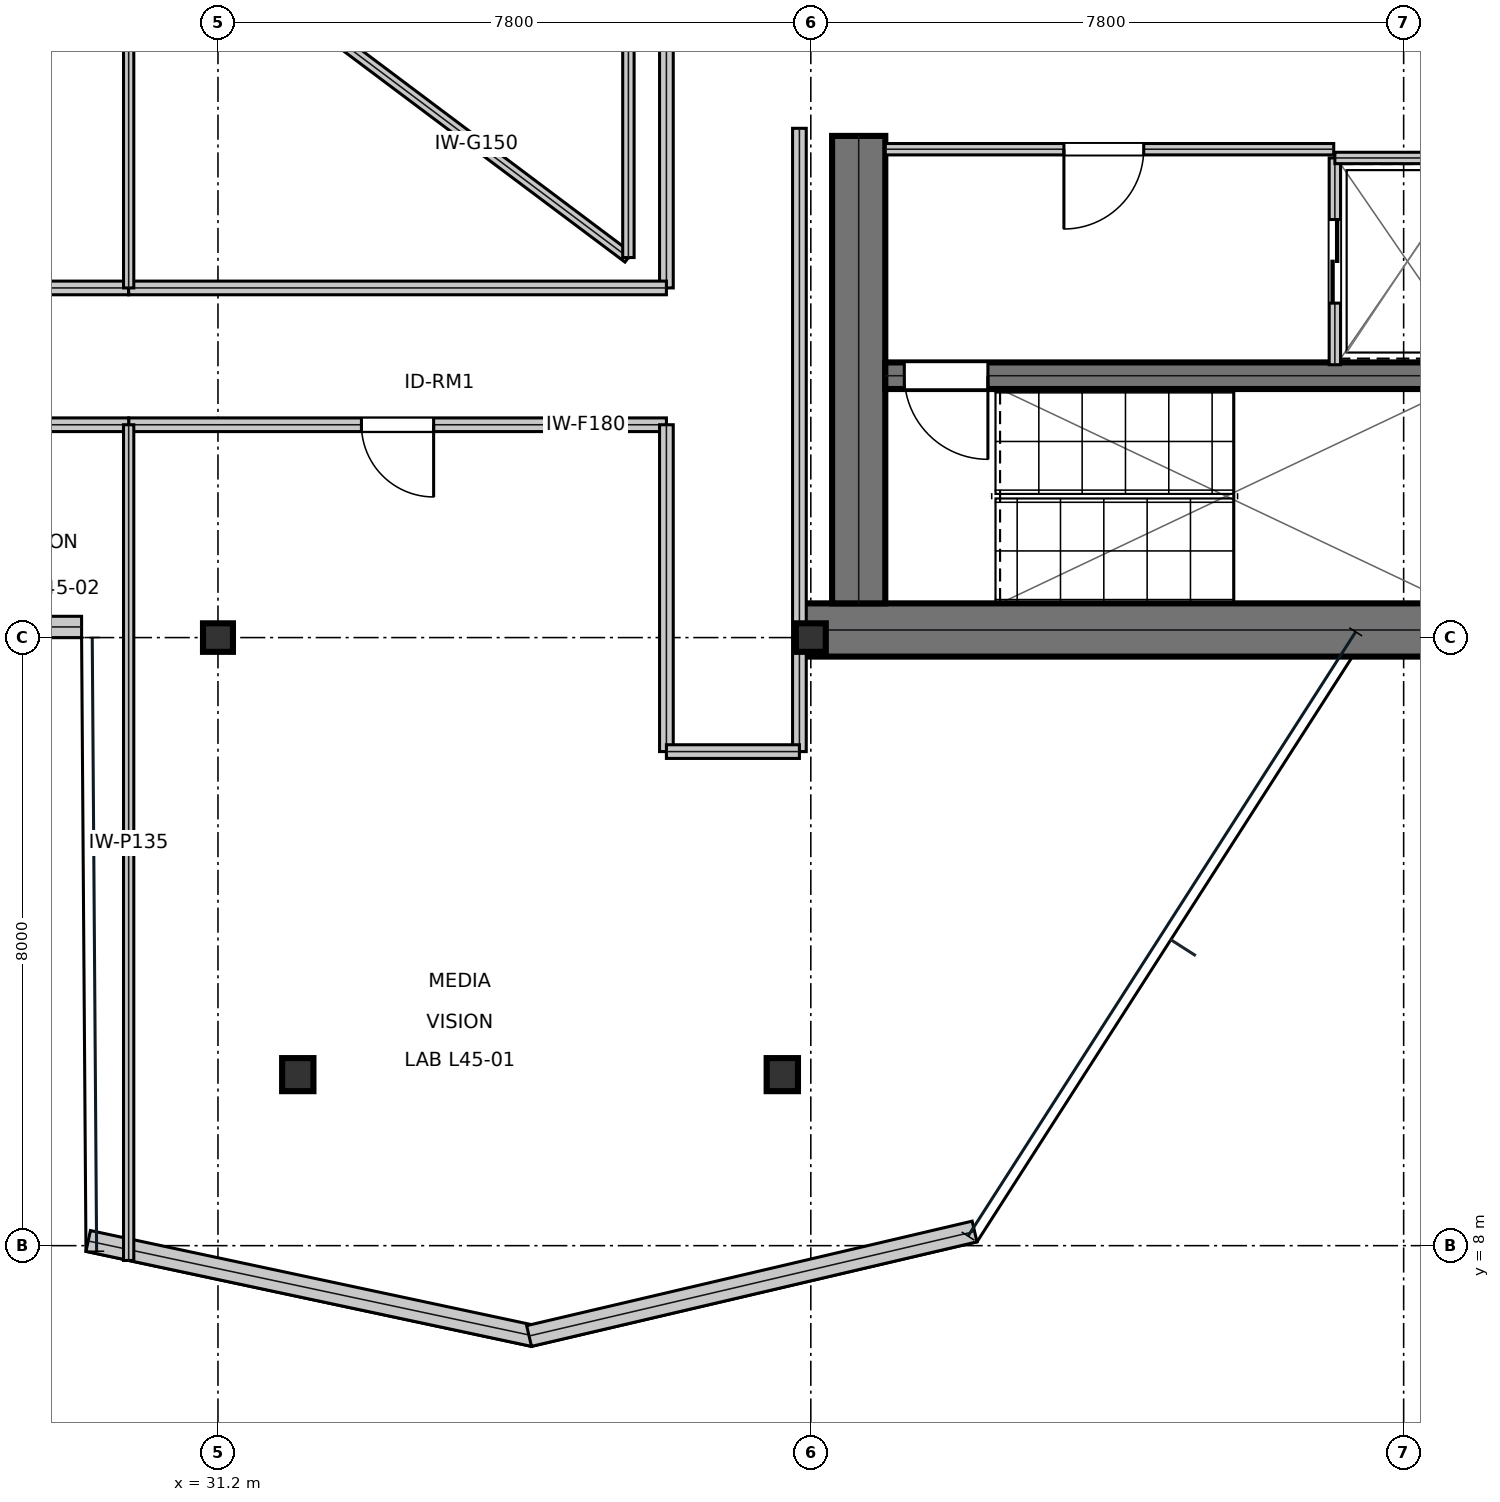
"""IFC4 building model, lengths in metres.
Left out: names, types, materials, properties, quantities, classifications, styles, units other than length and angle.
Written with IfcOpenShell. Run it as: python <this file> out.ifc"""

import sys

from ifc_helpers import new_model, si_unit, direction, frame, frame_2d, origin, origin_2d, place, context, subcontext, project, spatial, rectangle, i_section, extrude, element, fill, save


model = new_model("IFC4")
c1 = context("Model", 3, precision=1e-05, world=origin(), true_north=direction((0.0, 1.0)))
c2 = subcontext(c1, "Body", "Model", "MODEL_VIEW")
j1 = project(units=[si_unit("LENGTHUNIT", "METRE"), si_unit("PLANEANGLEUNIT", "RADIAN")], contexts=[c1])
p1 = place(None, origin())
s1 = spatial("IfcSite", under=j1, at=p1, CompositionType="ELEMENT")
p2 = place(p1, origin())
s2 = spatial("IfcBuilding", under=s1, at=p2, CompositionType="ELEMENT")
p3 = place(p2, frame((0.0, 0.0, 195.9)))
s3 = spatial("IfcBuildingStorey", under=s2, at=p3, CompositionType="ELEMENT", Elevation=195.9)
p4 = place(p3, frame((38.8, 16.1, 0.0), z_axis=(0.0, 0.0, 1.0), x_axis=(1.0, 0.0, 0.0)))
e1 = element("IfcWall", 1, at=p4, inside=s3, PredefinedType="SHEAR", context=c2, shape_type="SweptSolid", body=[
    extrude(rectangle(XDim=16.0, YDim=0.7, at=frame_2d((8.0, 0.0))), origin(), (0.0, 0.0, 1.0), 3.79),
])
p5 = place(p3, frame((39.63, 16.45, 0.0), z_axis=(0.0, 0.0, 1.0), x_axis=(0.0, 1.0, 0.0)))
e2 = element("IfcWall", 2, at=p5, inside=s3, PredefinedType="SHEAR", context=c2, shape_type="SweptSolid", body=[
    extrude(rectangle(XDim=6.15, YDim=0.7, at=frame_2d((3.075, 0.0))), origin(), (0.0, 0.0, 1.0), 3.79),
])
p6 = place(p3, frame((39.98, 19.445, 0.0), z_axis=(0.0, 0.0, 1.0), x_axis=(1.0, 0.0, 0.0)))
e3 = element("IfcWall", 3, at=p6, inside=s3, PredefinedType="SHEAR", context=c2, shape_type="SweptSolid", body=[
    extrude(rectangle(XDim=7.71, YDim=0.35, at=frame_2d((3.855, 0.0))), origin(), (0.0, 0.0, 1.0), 3.79),
])
p7 = place(p6, frame((0.25, 0.0, 0.0)))
e4 = element("IfcOpeningElement", 4, at=p7, cuts=e3, PredefinedType="OPENING", context=c2, shape_type="SweptSolid", body=[
    extrude(rectangle(XDim=1.1, YDim=2.15, at=frame_2d((0.55, 1.075))), frame((0.0, 0.185, 0.0), z_axis=(0.0, -1.0, 0.0), x_axis=(1.0, 0.0, 0.0)), (0.0, 0.0, 1.0), 0.37),
])
for number, where, z_axis, x_axis in (
    (5, (31.2, 16.0, 0.0), (0.0, 0.0, 1.0), (1.0, 0.0, 0.0)),
    (6, (39.0, 16.0, 0.0), (0.0, 0.0, 1.0), (1.0, 0.0, 0.0)),
):
    element("IfcColumn", number, at=place(p3, frame(where, z_axis=z_axis, x_axis=x_axis)), inside=s3, PredefinedType="COLUMN", context=c2, shape_type="SweptSolid", body=[
        extrude(i_section(OverallWidth=0.394, OverallDepth=0.375, WebThickness=0.017, FlangeThickness=0.028, at=origin_2d()), origin(), (0.0, 0.0, 1.0), 4.044),
    ])
for number, where, z_axis, x_axis in (
    (7, (32.25, 10.25, 0.016), (0.0, 0.0, 1.0), (1.0, 0.0, 0.0)),
    (8, (38.625, 10.25, 0.016), (0.0, 0.0, 1.0), (1.0, 0.0, 0.0)),
):
    element("IfcColumn", number, at=place(p3, frame(where, z_axis=z_axis, x_axis=x_axis)), inside=s3, PredefinedType="COLUMN", context=c2, shape_type="SweptSolid", body=[
        extrude(i_section(OverallWidth=0.412, OverallDepth=0.435, WebThickness=0.036, FlangeThickness=0.058, at=origin_2d()), origin(), (0.0, 0.0, 1.0), 4.018),
    ])
p8 = place(p3, frame((26.6, 16.14, 0.0), z_axis=(0.0, 0.0, 1.0), x_axis=(1.0, 0.0, 0.0)))
e9 = element("IfcWall", 9, at=p8, inside=s3, PredefinedType="STANDARD", context=c2, shape_type="SweptSolid", body=[
    extrude(rectangle(XDim=2.806, YDim=0.28, at=frame_2d((1.403, 0.0))), origin(), (0.0, 0.0, 1.0), 3.79),
])
p9 = place(p3, frame((29.492, 8.062, 0.0), z_axis=(0.0, 0.0, 1.0), x_axis=(0.978010564176, -0.208555355626, 0.0)))
e10 = element("IfcWall", 10, at=p9, inside=s3, PredefinedType="STANDARD", context=c2, shape_type="SweptSolid", body=[
    extrude(rectangle(XDim=5.994, YDim=0.28, at=frame_2d((2.997, 0.0))), origin(), (0.0, 0.0, 1.0), 3.79),
])
p10 = place(p3, frame((35.293, 6.811, 0.0), z_axis=(0.0, 0.0, 1.0), x_axis=(0.973574347184, 0.228370292517, 0.0)))
e11 = element("IfcWall", 11, at=p10, inside=s3, PredefinedType="STANDARD", context=c2, shape_type="SweptSolid", body=[
    extrude(rectangle(XDim=6.021, YDim=0.28, at=frame_2d((3.01, 0.0))), origin(), (0.0, 0.0, 1.0), 3.79),
])
p11 = place(p3, frame((39.98, 22.425, 0.0), z_axis=(0.0, 0.0, 1.0), x_axis=(1.0, 0.0, 0.0)))
e12 = element("IfcWall", 12, at=p11, inside=s3, PredefinedType="PARTITIONING", context=c2, shape_type="SweptSolid", body=[
    extrude(rectangle(XDim=5.9, YDim=0.15, at=frame_2d((2.95, 0.0))), origin(), (0.0, 0.0, 1.0), 3.79),
])
p12 = place(p11, frame((2.35, 0.0, 0.0)))
e13 = element("IfcOpeningElement", 13, at=p12, cuts=e12, PredefinedType="OPENING", context=c2, shape_type="SweptSolid", body=[
    extrude(rectangle(XDim=1.05, YDim=2.15, at=frame_2d((0.525, 1.075))), frame((0.0, 0.085, 0.0), z_axis=(0.0, -1.0, 0.0), x_axis=(1.0, 0.0, 0.0)), (0.0, 0.0, 1.0), 0.17),
])
p13 = place(p3, frame((45.895, 19.59, 0.0), z_axis=(0.0, 0.0, 1.0), x_axis=(0.0, 1.0, 0.0)))
e14 = element("IfcWall", 14, at=p13, inside=s3, PredefinedType="PARTITIONING", context=c2, shape_type="SweptSolid", body=[
    extrude(rectangle(XDim=2.72, YDim=0.15, at=frame_2d((1.36, 0.0))), origin(), (0.0, 0.0, 1.0), 3.79),
])
p14 = place(p13, frame((0.81, 0.0, 0.0)))
e15 = element("IfcOpeningElement", 15, at=p14, cuts=e14, PredefinedType="OPENING", context=c2, shape_type="SweptSolid", body=[
    extrude(rectangle(XDim=1.1, YDim=2.15, at=frame_2d((0.55, 1.075))), frame((0.0, 0.085, 0.0), z_axis=(0.0, -1.0, 0.0), x_axis=(1.0, 0.0, 0.0)), (0.0, 0.0, 1.0), 0.17),
])
p15 = place(p3, frame((45.895, 22.31, 0.0), z_axis=(0.0, 0.0, 1.0), x_axis=(1.0, 0.0, 0.0)))
e16 = element("IfcWall", 16, at=p15, inside=s3, PredefinedType="PARTITIONING", context=c2, shape_type="SweptSolid", body=[
    extrude(rectangle(XDim=1.915, YDim=0.15, at=frame_2d((0.958, 0.0))), origin(), (0.0, 0.0, 1.0), 3.79),
])
p16 = place(p3, frame((30.025, 18.8, 0.0), z_axis=(0.0, 0.0, 1.0), x_axis=(1.0, 0.0, 0.0)))
e17 = element("IfcWall", 17, at=p16, inside=s3, PredefinedType="SOLIDWALL", context=c2, shape_type="SweptSolid", body=[
    extrude(rectangle(XDim=7.075, YDim=0.18, at=frame_2d((3.538, 0.0))), origin(), (0.0, 0.0, 1.0), 3.241),
])
p17 = place(p16, frame((3.062, 0.0, 0.0)))
e18 = element("IfcOpeningElement", 18, at=p17, cuts=e17, PredefinedType="OPENING", context=c2, shape_type="SweptSolid", body=[
    extrude(rectangle(XDim=0.95, YDim=2.15, at=frame_2d((0.475, 1.075))), frame((0.0, 0.1, 0.0), z_axis=(0.0, -1.0, 0.0), x_axis=(1.0, 0.0, 0.0)), (0.0, 0.0, 1.0), 0.2),
])
p18 = place(p3, frame((26.4, 18.8, 0.0), z_axis=(0.0, 0.0, 1.0), x_axis=(1.0, 0.0, 0.0)))
e19 = element("IfcWall", 19, at=p18, inside=s3, PredefinedType="SOLIDWALL", context=c2, shape_type="SweptSolid", body=[
    extrude(rectangle(XDim=3.625, YDim=0.18, at=frame_2d((1.812, 0.0))), origin(), (0.0, 0.0, 1.0), 3.79),
])
p19 = place(p18, frame((1.337, 0.0, 0.0)))
e20 = element("IfcOpeningElement", 20, at=p19, cuts=e19, PredefinedType="OPENING", context=c2, shape_type="SweptSolid", body=[
    extrude(rectangle(XDim=0.95, YDim=2.15, at=frame_2d((0.475, 1.075))), frame((0.0, 0.1, 0.0), z_axis=(0.0, -1.0, 0.0), x_axis=(1.0, 0.0, 0.0)), (0.0, 0.0, 1.0), 0.2),
])
p20 = place(p3, frame((37.1, 20.6, 0.0), z_axis=(0.0, 0.0, 1.0), x_axis=(0.0, 1.0, 0.0)))
e21 = element("IfcWall", 21, at=p20, inside=s3, PredefinedType="SOLIDWALL", context=c2, shape_type="SweptSolid", body=[
    extrude(rectangle(XDim=12.9, YDim=0.18, at=frame_2d((6.45, 0.0))), origin(), (0.0, 0.0, 1.0), 3.241),
])
p21 = place(p20, frame((7.415, 0.0, 0.0)))
e22 = element("IfcOpeningElement", 22, at=p21, cuts=e21, PredefinedType="OPENING", context=c2, shape_type="SweptSolid", body=[
    extrude(rectangle(XDim=0.95, YDim=2.15, at=frame_2d((0.475, 1.075))), frame((0.0, 0.1, 0.0), z_axis=(0.0, -1.0, 0.0), x_axis=(1.0, 0.0, 0.0)), (0.0, 0.0, 1.0), 0.2),
])
p22 = place(p3, frame((38.85, 14.5, 0.0), z_axis=(0.0, 0.0, 1.0), x_axis=(0.0, 1.0, 0.0)))
e23 = element("IfcWall", 23, at=p22, inside=s3, PredefinedType="SOLIDWALL", context=c2, shape_type="SweptSolid", body=[
    extrude(rectangle(XDim=8.2, YDim=0.18, at=frame_2d((4.1, 0.0))), origin(), (0.0, 0.0, 1.0), 3.241),
])
p23 = place(p3, frame((37.1, 14.5, 0.0), z_axis=(0.0, 0.0, 1.0), x_axis=(0.0, 1.0, 0.0)))
e24 = element("IfcWall", 24, at=p23, inside=s3, PredefinedType="SOLIDWALL", context=c2, shape_type="SweptSolid", body=[
    extrude(rectangle(XDim=4.3, YDim=0.18, at=frame_2d((2.15, 0.0))), origin(), (0.0, 0.0, 1.0), 3.241),
])
p24 = place(p3, frame((37.1, 14.5, 0.0), z_axis=(0.0, 0.0, 1.0), x_axis=(1.0, 0.0, 0.0)))
e25 = element("IfcWall", 25, at=p24, inside=s3, PredefinedType="SOLIDWALL", context=c2, shape_type="SweptSolid", body=[
    extrude(rectangle(XDim=1.75, YDim=0.18, at=frame_2d((0.875, 0.0))), origin(), (0.0, 0.0, 1.0), 3.241),
])
p25 = place(p3, frame((26.4, 20.6, 0.0), z_axis=(0.0, 0.0, 1.0), x_axis=(1.0, 0.0, 0.0)))
e26 = element("IfcWall", 26, at=p25, inside=s3, PredefinedType="SOLIDWALL", context=c2, shape_type="SweptSolid", body=[
    extrude(rectangle(XDim=3.625, YDim=0.18, at=frame_2d((1.812, 0.0))), origin(), (0.0, 0.0, 1.0), 3.79),
])
p26 = place(p3, frame((30.025, 20.6, 0.0), z_axis=(0.0, 0.0, 1.0), x_axis=(1.0, 0.0, 0.0)))
e27 = element("IfcWall", 27, at=p26, inside=s3, PredefinedType="SOLIDWALL", context=c2, shape_type="SweptSolid", body=[
    extrude(rectangle(XDim=7.075, YDim=0.18, at=frame_2d((3.538, 0.0))), origin(), (0.0, 0.0, 1.0), 3.241),
])
p27 = place(p3, frame((30.025, 7.805, 0.0), z_axis=(0.0, 0.0, 1.0), x_axis=(0.0, 1.0, 0.0)))
e28 = element("IfcWall", 28, at=p27, inside=s3, PredefinedType="PARTITIONING", context=c2, shape_type="SweptSolid", body=[
    extrude(rectangle(XDim=10.995, YDim=0.135, at=frame_2d((5.498, 0.0))), origin(), (0.0, 0.0, 1.0), 3.319),
])
p28 = place(p3, frame((30.025, 20.6, 0.0), z_axis=(0.0, 0.0, 1.0), x_axis=(0.0, 1.0, 0.0)))
e29 = element("IfcWall", 29, at=p28, inside=s3, PredefinedType="PARTITIONING", context=c2, shape_type="SweptSolid", body=[
    extrude(rectangle(XDim=19.595, YDim=0.135, at=frame_2d((9.797, 0.0))), origin(), (0.0, 0.0, 1.0), 3.241),
])
p29 = place(p3, frame((32.6, 24.0, 0.0), z_axis=(0.0, 0.0, 1.0), x_axis=(0.8, -0.6, 0.0)))
e30 = element("IfcWall", 30, at=p29, inside=s3, PredefinedType="MOVABLE", context=c2, shape_type="SweptSolid", body=[
    extrude(rectangle(XDim=5.0, YDim=0.15, at=frame_2d((2.5, 0.0))), origin(), (0.0, 0.0, 1.0), 3.79),
])
p30 = place(p3, frame((36.6, 21.0, 0.0), z_axis=(0.0, 0.0, 1.0), x_axis=(0.0, 1.0, 0.0)))
e31 = element("IfcWall", 31, at=p30, inside=s3, PredefinedType="MOVABLE", context=c2, shape_type="SweptSolid", body=[
    extrude(rectangle(XDim=6.0, YDim=0.15, at=frame_2d((3.0, 0.0))), origin(), (0.0, 0.0, 1.0), 3.79),
])
p31 = place(p12, frame((1.05, 0.0, 0.0), z_axis=(0.0, 0.0, 1.0), x_axis=(-1.0, 0.0, 0.0)))
e32 = element("IfcDoor", 32, at=p31, inside=s3, OperationType="SINGLE_SWING_RIGHT", PredefinedType="DOOR", context=c2, shape_type="SweptSolid", body=[
    extrude(rectangle(XDim=1.05, YDim=2.15, at=frame_2d((0.525, 1.075))), frame((0.0, 0.025, 0.0), z_axis=(0.0, -1.0, 0.0), x_axis=(1.0, 0.0, 0.0)), (0.0, 0.0, 1.0), 0.05),
])
fill(e13, e32)
p32 = place(p14, frame((1.1, 0.0, 0.0), z_axis=(0.0, 0.0, 1.0), x_axis=(-1.0, 0.0, 0.0)))
e33 = element("IfcDoor", 33, at=p32, inside=s3, OperationType="DOUBLE_DOOR_SLIDING", PredefinedType="DOOR", context=c2, shape_type="SweptSolid", body=[
    extrude(rectangle(XDim=1.1, YDim=2.15, at=frame_2d((0.55, 1.075))), frame((0.0, 0.025, 0.0), z_axis=(0.0, -1.0, 0.0), x_axis=(1.0, 0.0, 0.0)), (0.0, 0.0, 1.0), 0.05),
])
fill(e15, e33)
p33 = place(p17, frame((0.95, 0.0, 0.0), z_axis=(0.0, 0.0, 1.0), x_axis=(-1.0, 0.0, 0.0)))
e34 = element("IfcDoor", 34, at=p33, inside=s3, OperationType="SINGLE_SWING_LEFT", PredefinedType="DOOR", context=c2, shape_type="SweptSolid", body=[
    extrude(rectangle(XDim=0.95, YDim=2.15, at=frame_2d((0.475, 1.075))), frame((0.0, 0.025, 0.0), z_axis=(0.0, -1.0, 0.0), x_axis=(1.0, 0.0, 0.0)), (0.0, 0.0, 1.0), 0.05),
])
fill(e18, e34)
p34 = place(p7, frame((1.1, 0.0, 0.0), z_axis=(0.0, 0.0, 1.0), x_axis=(-1.0, 0.0, 0.0)))
e35 = element("IfcDoor", 35, at=p34, inside=s3, OperationType="SINGLE_SWING_LEFT", PredefinedType="DOOR", context=c2, shape_type="SweptSolid", body=[
    extrude(rectangle(XDim=1.1, YDim=2.15, at=frame_2d((0.55, 1.075))), frame((0.0, 0.025, 0.0), z_axis=(0.0, -1.0, 0.0), x_axis=(1.0, 0.0, 0.0)), (0.0, 0.0, 1.0), 0.05),
])
fill(e4, e35)
save(model, sys.argv[1])
